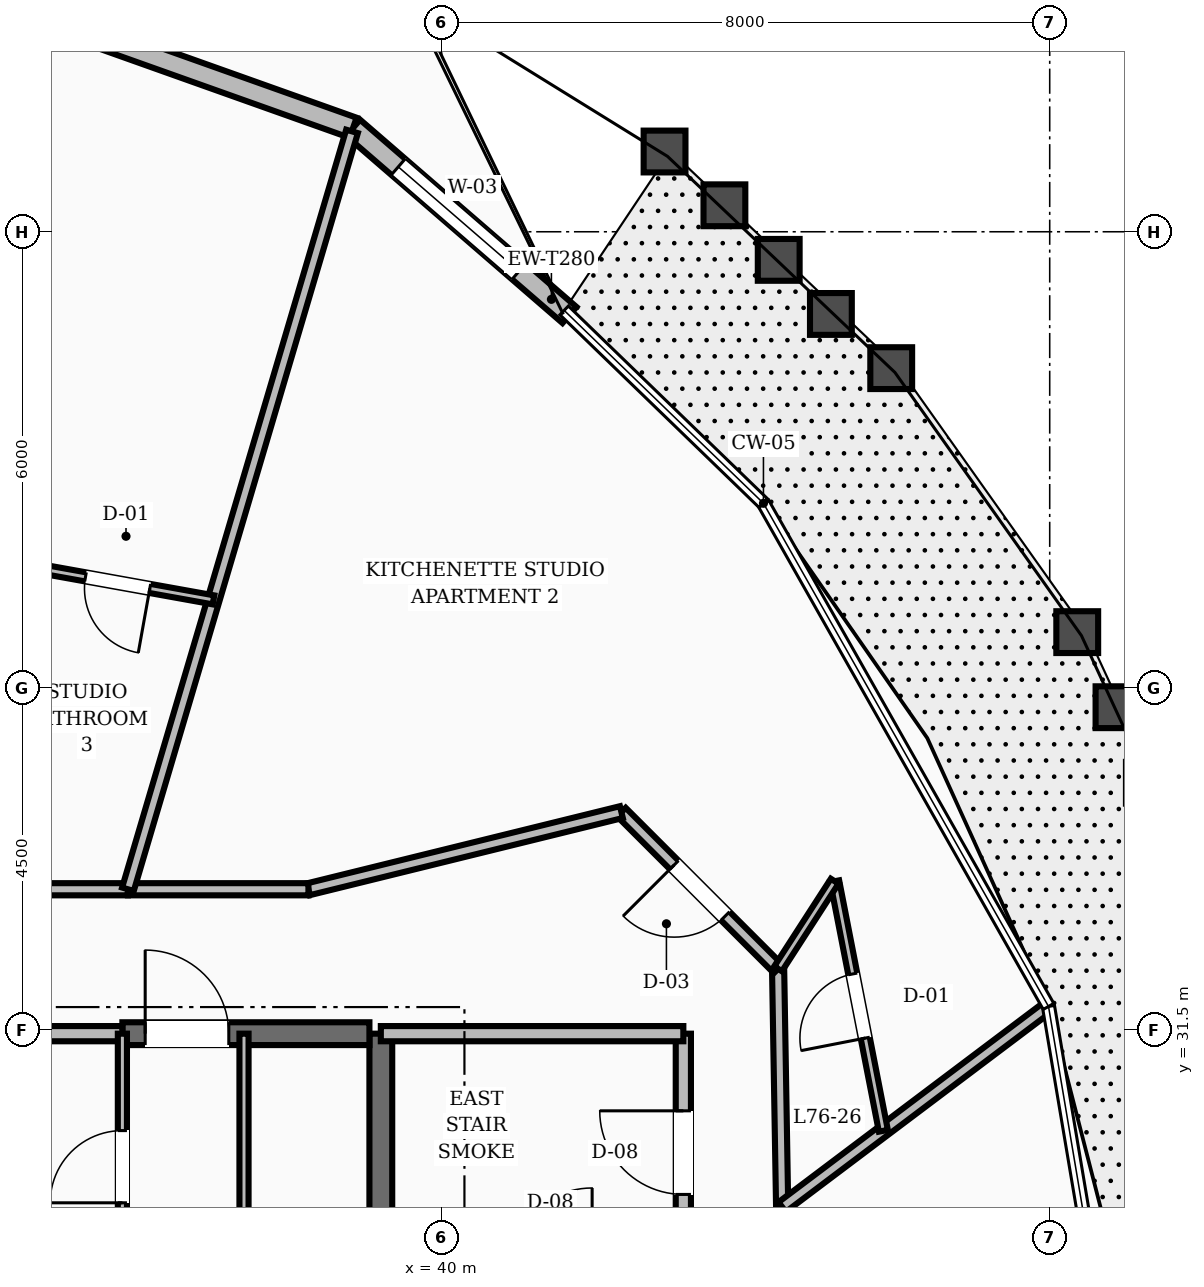
"""IFC4 building model, lengths in metres.
Left out: names, types, materials, properties, quantities, classifications, styles, units other than length and angle.
Written with IfcOpenShell. Run it as: python <this file> out.ifc"""

import sys

from ifc_helpers import new_model, si_unit, direction, frame, frame_2d, origin, place, context, subcontext, project, spatial, rectangle, extrude, element, fill, save


model = new_model("IFC4")
c1 = context("Model", 3, precision=1e-05, world=origin(), true_north=direction((0.0, 1.0)))
c2 = subcontext(c1, "Body", "Model", "MODEL_VIEW")
j1 = project(units=[si_unit("LENGTHUNIT", "METRE"), si_unit("PLANEANGLEUNIT", "RADIAN")], contexts=[c1])
p1 = place(None, origin())
s1 = spatial("IfcSite", under=j1, at=p1, CompositionType="ELEMENT")
p2 = place(p1, origin())
s2 = spatial("IfcBuilding", under=s1, at=p2, CompositionType="ELEMENT")
p3 = place(p2, frame((0.0, 0.0, 290.4)))
s3 = spatial("IfcBuildingStorey", under=s2, at=p3, CompositionType="ELEMENT", Elevation=290.4)
p4 = place(p3, frame((39.2, 25.15, 0.0), z_axis=(0.0, 0.0, 1.0), x_axis=(0.0, 1.0, 0.0)))
e1 = element("IfcWall", 1, at=p4, inside=s3, PredefinedType="SHEAR", context=c2, shape_type="SweptSolid", body=[
    extrude(rectangle(XDim=6.3, YDim=0.3, at=frame_2d((3.15, 0.0))), origin(), (0.0, 0.0, 1.0), 3.6),
])
p5 = place(p3, frame((35.8, 31.45, 0.0), z_axis=(0.0, 0.0, 1.0), x_axis=(1.0, 0.0, 0.0)))
e2 = element("IfcWall", 2, at=p5, inside=s3, PredefinedType="SHEAR", context=c2, shape_type="SweptSolid", body=[
    extrude(rectangle(XDim=3.25, YDim=0.3, at=frame_2d((1.625, 0.0))), origin(), (0.0, 0.0, 1.0), 3.6),
])
p6 = place(p5, frame((0.3, 0.0, 0.0)))
e3 = element("IfcOpeningElement", 3, at=p6, cuts=e2, PredefinedType="OPENING", context=c2, shape_type="SweptSolid", body=[
    extrude(rectangle(XDim=1.1, YDim=2.1, at=frame_2d((0.55, 1.05))), frame((0.0, 0.16, 0.0), z_axis=(0.0, -1.0, 0.0), x_axis=(1.0, 0.0, 0.0)), (0.0, 0.0, 1.0), 0.32),
])
p7 = place(p3, frame((41.682, 40.905, 0.0), z_axis=(0.0, 0.0, 1.0), x_axis=(-0.756185346013, 0.654357488286, 0.0)))
e4 = element("IfcWall", 4, at=p7, inside=s3, PredefinedType="STANDARD", context=c2, shape_type="SweptSolid", body=[
    extrude(rectangle(XDim=3.764, YDim=0.28, at=frame_2d((1.882, 0.0))), origin(), (0.0, 0.0, 1.0), 2.88),
])
p8 = place(p7, frame((0.878, 0.0, 0.8)))
e5 = element("IfcOpeningElement", 5, at=p8, cuts=e4, PredefinedType="OPENING", context=c2, shape_type="SweptSolid", body=[
    extrude(rectangle(XDim=2.1, YDim=1.65, at=frame_2d((1.05, 0.825))), frame((0.0, 0.15, 0.0), z_axis=(0.0, -1.0, 0.0), x_axis=(1.0, 0.0, 0.0)), (0.0, 0.0, 1.0), 0.3),
])
p9 = place(p3, frame((38.835, 43.368, 0.0), z_axis=(0.0, 0.0, 1.0), x_axis=(-0.94207690039, 0.335396949527, 0.0)))
e6 = element("IfcWall", 6, at=p9, inside=s3, PredefinedType="STANDARD", context=c2, shape_type="SweptSolid", body=[
    extrude(rectangle(XDim=3.557, YDim=0.28, at=frame_2d((1.778, 0.0))), origin(), (0.0, 0.0, 1.0), 2.88),
])
p10 = place(p3, frame((43.18, 28.32, 0.0), z_axis=(0.0, 0.0, 1.0), x_axis=(0.0, 1.0, 0.0)))
e7 = element("IfcWall", 7, at=p10, inside=s3, PredefinedType="SOLIDWALL", context=c2, shape_type="SweptSolid", body=[
    extrude(rectangle(XDim=3.13, YDim=0.2, at=frame_2d((1.565, 0.0))), origin(), (0.0, 0.0, 1.0), 2.87),
])
p11 = place(p10, frame((1.015, 0.0, 0.0)))
e8 = element("IfcOpeningElement", 8, at=p11, cuts=e7, PredefinedType="OPENING", context=c2, shape_type="SweptSolid", body=[
    extrude(rectangle(XDim=1.1, YDim=2.1, at=frame_2d((0.55, 1.05))), frame((0.0, 0.11, 0.0), z_axis=(0.0, -1.0, 0.0), x_axis=(1.0, 0.0, 0.0)), (0.0, 0.0, 1.0), 0.22),
])
p12 = place(p3, frame((39.2, 31.45, 0.0), z_axis=(0.0, 0.0, 1.0), x_axis=(1.0, 0.0, 0.0)))
e9 = element("IfcWall", 9, at=p12, inside=s3, PredefinedType="SOLIDWALL", context=c2, shape_type="SweptSolid", body=[
    extrude(rectangle(XDim=3.98, YDim=0.2, at=frame_2d((1.99, 0.0))), origin(), (0.0, 0.0, 1.0), 2.87),
])
p13 = place(p3, frame((28.2, 31.45, 0.0), z_axis=(0.0, 0.0, 1.0), x_axis=(1.0, 0.0, 0.0)))
e10 = element("IfcWall", 10, at=p13, inside=s3, PredefinedType="SOLIDWALL", context=c2, shape_type="SweptSolid", body=[
    extrude(rectangle(XDim=7.6, YDim=0.2, at=frame_2d((3.8, 0.0))), origin(), (0.0, 0.0, 1.0), 2.87),
])
p14 = place(p3, frame((35.8, 27.95, 0.0), z_axis=(0.0, 0.0, 1.0), x_axis=(0.0, 1.0, 0.0)))
e11 = element("IfcWall", 11, at=p14, inside=s3, PredefinedType="PARTITIONING", context=c2, shape_type="SweptSolid", body=[
    extrude(rectangle(XDim=3.5, YDim=0.12, at=frame_2d((1.75, 0.0))), origin(), (0.0, 0.0, 1.0), 2.87),
])
p15 = place(p14, frame((1.275, 0.0, 0.0)))
e12 = element("IfcOpeningElement", 12, at=p15, cuts=e11, PredefinedType="OPENING", context=c2, shape_type="SweptSolid", body=[
    extrude(rectangle(XDim=0.95, YDim=2.1, at=frame_2d((0.475, 1.05))), frame((0.0, 0.07, 0.0), z_axis=(0.0, -1.0, 0.0), x_axis=(1.0, 0.0, 0.0)), (0.0, 0.0, 1.0), 0.14),
])
p16 = place(p3, frame((37.4, 25.25, 0.0), z_axis=(0.0, 0.0, 1.0), x_axis=(0.0, 1.0, 0.0)))
e13 = element("IfcWall", 13, at=p16, inside=s3, PredefinedType="PARTITIONING", context=c2, shape_type="SweptSolid", body=[
    extrude(rectangle(XDim=6.2, YDim=0.12, at=frame_2d((3.1, 0.0))), origin(), (0.0, 0.0, 1.0), 2.87),
])
p17 = place(p16, frame((2.625, 0.0, 0.0)))
e14 = element("IfcOpeningElement", 14, at=p17, cuts=e13, PredefinedType="OPENING", context=c2, shape_type="SweptSolid", body=[
    extrude(rectangle(XDim=0.95, YDim=2.1, at=frame_2d((0.475, 1.05))), frame((0.0, 0.07, 0.0), z_axis=(0.0, -1.0, 0.0), x_axis=(1.0, 0.0, 0.0)), (0.0, 0.0, 1.0), 0.14),
])
p18 = place(p3, frame((44.48, 29.169, 0.0), z_axis=(0.0, 0.0, 1.0), x_axis=(-0.016981035134, 0.999855811828, 0.0)))
e15 = element("IfcWall", 15, at=p18, inside=s3, PredefinedType="SOLIDWALL", context=c2, shape_type="SweptSolid", body=[
    extrude(rectangle(XDim=3.134, YDim=0.16, at=frame_2d((1.567, 0.0))), origin(), (0.0, 0.0, 1.0), 2.87),
])
p19 = place(p3, frame((44.427, 32.303, 0.0), z_axis=(0.0, 0.0, 1.0), x_axis=(-0.707106781187, 0.707106781187, 0.0)))
e16 = element("IfcWall", 16, at=p19, inside=s3, PredefinedType="SOLIDWALL", context=c2, shape_type="SweptSolid", body=[
    extrude(rectangle(XDim=2.916, YDim=0.16, at=frame_2d((1.458, 0.0))), origin(), (0.0, 0.0, 1.0), 2.87),
])
p20 = place(p19, frame((0.983, 0.0, 0.0)))
e17 = element("IfcOpeningElement", 17, at=p20, cuts=e16, PredefinedType="OPENING", context=c2, shape_type="SweptSolid", body=[
    extrude(rectangle(XDim=0.95, YDim=2.1, at=frame_2d((0.475, 1.05))), frame((0.0, 0.09, 0.0), z_axis=(0.0, -1.0, 0.0), x_axis=(1.0, 0.0, 0.0)), (0.0, 0.0, 1.0), 0.18),
])
p21 = place(p3, frame((42.365, 34.365, 0.0), z_axis=(0.0, 0.0, 1.0), x_axis=(-0.970939799552, -0.239323850978, 0.0)))
e18 = element("IfcWall", 18, at=p21, inside=s3, PredefinedType="SOLIDWALL", context=c2, shape_type="SweptSolid", body=[
    extrude(rectangle(XDim=4.241, YDim=0.16, at=frame_2d((2.12, 0.0))), origin(), (0.0, 0.0, 1.0), 2.87),
])
p22 = place(p3, frame((38.248, 33.35, 0.0), z_axis=(0.0, 0.0, 1.0), x_axis=(-1.0, 0.0, 0.0)))
e19 = element("IfcWall", 19, at=p22, inside=s3, PredefinedType="SOLIDWALL", context=c2, shape_type="SweptSolid", body=[
    extrude(rectangle(XDim=2.375, YDim=0.16, at=frame_2d((1.188, 0.0))), origin(), (0.0, 0.0, 1.0), 2.87),
])
p23 = place(p3, frame((35.873, 33.35, 0.0), z_axis=(0.0, 0.0, 1.0), x_axis=(-1.0, 0.0, 0.0)))
e20 = element("IfcWall", 20, at=p23, inside=s3, PredefinedType="SOLIDWALL", context=c2, shape_type="SweptSolid", body=[
    extrude(rectangle(XDim=2.013, YDim=0.16, at=frame_2d((1.006, 0.0))), origin(), (0.0, 0.0, 1.0), 2.87),
])
p24 = place(p3, frame((44.48, 29.169, 0.0), z_axis=(0.0, 0.0, 1.0), x_axis=(0.798823029679, 0.6015660955, 0.0)))
e21 = element("IfcWall", 21, at=p24, inside=s3, PredefinedType="SOLIDWALL", context=c2, shape_type="SweptSolid", body=[
    extrude(rectangle(XDim=4.337, YDim=0.16, at=frame_2d((2.168, 0.0))), origin(), (0.0, 0.0, 1.0), 2.87),
])
p25 = place(p3, frame((45.812, 30.172, 0.0), z_axis=(0.0, 0.0, 1.0), x_axis=(-0.191482926261, 0.981495944439, 0.0)))
e22 = element("IfcWall", 22, at=p25, inside=s3, PredefinedType="PARTITIONING", context=c2, shape_type="SweptSolid", body=[
    extrude(rectangle(XDim=3.346, YDim=0.12, at=frame_2d((1.673, 0.0))), origin(), (0.0, 0.0, 1.0), 2.87),
])
p26 = place(p25, frame((1.243, 0.0, 0.0)))
e23 = element("IfcOpeningElement", 23, at=p26, cuts=e22, PredefinedType="OPENING", context=c2, shape_type="SweptSolid", body=[
    extrude(rectangle(XDim=0.86, YDim=2.1, at=frame_2d((0.43, 1.05))), frame((0.0, 0.07, 0.0), z_axis=(0.0, -1.0, 0.0), x_axis=(1.0, 0.0, 0.0)), (0.0, 0.0, 1.0), 0.14),
])
p27 = place(p3, frame((44.427, 32.303, 0.0), z_axis=(0.0, 0.0, 1.0), x_axis=(0.542402466018, 0.840118780207, 0.0)))
e24 = element("IfcWall", 24, at=p27, inside=s3, PredefinedType="PARTITIONING", context=c2, shape_type="SweptSolid", body=[
    extrude(rectangle(XDim=1.372, YDim=0.12, at=frame_2d((0.686, 0.0))), origin(), (0.0, 0.0, 1.0), 2.87),
])
p28 = place(p3, frame((35.873, 33.35, 0.0), z_axis=(0.0, 0.0, 1.0), x_axis=(0.283560622835, 0.958954312351, 0.0)))
e25 = element("IfcWall", 25, at=p28, inside=s3, PredefinedType="SOLIDWALL", context=c2, shape_type="SweptSolid", body=[
    extrude(rectangle(XDim=10.397, YDim=0.16, at=frame_2d((5.199, 0.0))), origin(), (0.0, 0.0, 1.0), 2.87),
])
p29 = place(p3, frame((36.999, 37.157, 0.0), z_axis=(0.0, 0.0, 1.0), x_axis=(-0.984214215715, 0.176981291622, 0.0)))
e26 = element("IfcWall", 26, at=p29, inside=s3, PredefinedType="PARTITIONING", context=c2, shape_type="SweptSolid", body=[
    extrude(rectangle(XDim=2.562, YDim=0.12, at=frame_2d((1.281, 0.0))), origin(), (0.0, 0.0, 1.0), 2.87),
])
p30 = place(p29, frame((0.851, 0.0, 0.0)))
e27 = element("IfcOpeningElement", 27, at=p30, cuts=e26, PredefinedType="OPENING", context=c2, shape_type="SweptSolid", body=[
    extrude(rectangle(XDim=0.86, YDim=2.1, at=frame_2d((0.43, 1.05))), frame((0.0, 0.07, 0.0), z_axis=(0.0, -1.0, 0.0), x_axis=(1.0, 0.0, 0.0)), (0.0, 0.0, 1.0), 0.14),
])
p31 = place(p8, origin())
e28 = element("IfcWindow", 28, at=p31, inside=s3, PartitioningType="SINGLE_PANEL", PredefinedType="WINDOW", context=c2, shape_type="SweptSolid", body=[
    extrude(rectangle(XDim=2.1, YDim=1.65, at=frame_2d((1.05, 0.825))), frame((0.0, 0.03, 0.0), z_axis=(0.0, -1.0, 0.0), x_axis=(1.0, 0.0, 0.0)), (0.0, 0.0, 1.0), 0.06),
])
fill(e5, e28)
p32 = place(p11, origin())
e29 = element("IfcDoor", 29, at=p32, inside=s3, OperationType="SINGLE_SWING_RIGHT", PredefinedType="DOOR", context=c2, shape_type="SweptSolid", body=[
    extrude(rectangle(XDim=1.1, YDim=2.1, at=frame_2d((0.55, 1.05))), frame((0.0, 0.025, 0.0), z_axis=(0.0, -1.0, 0.0), x_axis=(1.0, 0.0, 0.0)), (0.0, 0.0, 1.0), 0.05),
])
fill(e8, e29)
p33 = place(p6, origin())
e30 = element("IfcDoor", 30, at=p33, inside=s3, OperationType="SINGLE_SWING_LEFT", PredefinedType="DOOR", context=c2, shape_type="SweptSolid", body=[
    extrude(rectangle(XDim=1.1, YDim=2.1, at=frame_2d((0.55, 1.05))), frame((0.0, 0.025, 0.0), z_axis=(0.0, -1.0, 0.0), x_axis=(1.0, 0.0, 0.0)), (0.0, 0.0, 1.0), 0.05),
])
fill(e3, e30)
p34 = place(p15, origin())
e31 = element("IfcDoor", 31, at=p34, inside=s3, OperationType="SINGLE_SWING_LEFT", PredefinedType="DOOR", context=c2, shape_type="SweptSolid", body=[
    extrude(rectangle(XDim=0.95, YDim=2.1, at=frame_2d((0.475, 1.05))), frame((0.0, 0.025, 0.0), z_axis=(0.0, -1.0, 0.0), x_axis=(1.0, 0.0, 0.0)), (0.0, 0.0, 1.0), 0.05),
])
fill(e12, e31)
p35 = place(p26, origin())
e32 = element("IfcDoor", 32, at=p35, inside=s3, OperationType="SINGLE_SWING_LEFT", PredefinedType="DOOR", context=c2, shape_type="SweptSolid", body=[
    extrude(rectangle(XDim=0.86, YDim=2.1, at=frame_2d((0.43, 1.05))), frame((0.0, 0.025, 0.0), z_axis=(0.0, -1.0, 0.0), x_axis=(1.0, 0.0, 0.0)), (0.0, 0.0, 1.0), 0.05),
])
fill(e23, e32)
p36 = place(p20, origin())
e33 = element("IfcDoor", 33, at=p36, inside=s3, OperationType="SINGLE_SWING_RIGHT", PredefinedType="DOOR", context=c2, shape_type="SweptSolid", body=[
    extrude(rectangle(XDim=0.95, YDim=2.1, at=frame_2d((0.475, 1.05))), frame((0.0, 0.025, 0.0), z_axis=(0.0, -1.0, 0.0), x_axis=(1.0, 0.0, 0.0)), (0.0, 0.0, 1.0), 0.05),
])
fill(e17, e33)
p37 = place(p30, origin())
e34 = element("IfcDoor", 34, at=p37, inside=s3, OperationType="SINGLE_SWING_LEFT", PredefinedType="DOOR", context=c2, shape_type="SweptSolid", body=[
    extrude(rectangle(XDim=0.86, YDim=2.1, at=frame_2d((0.43, 1.05))), frame((0.0, 0.025, 0.0), z_axis=(0.0, -1.0, 0.0), x_axis=(1.0, 0.0, 0.0)), (0.0, 0.0, 1.0), 0.05),
])
fill(e27, e34)
save(model, sys.argv[1])
